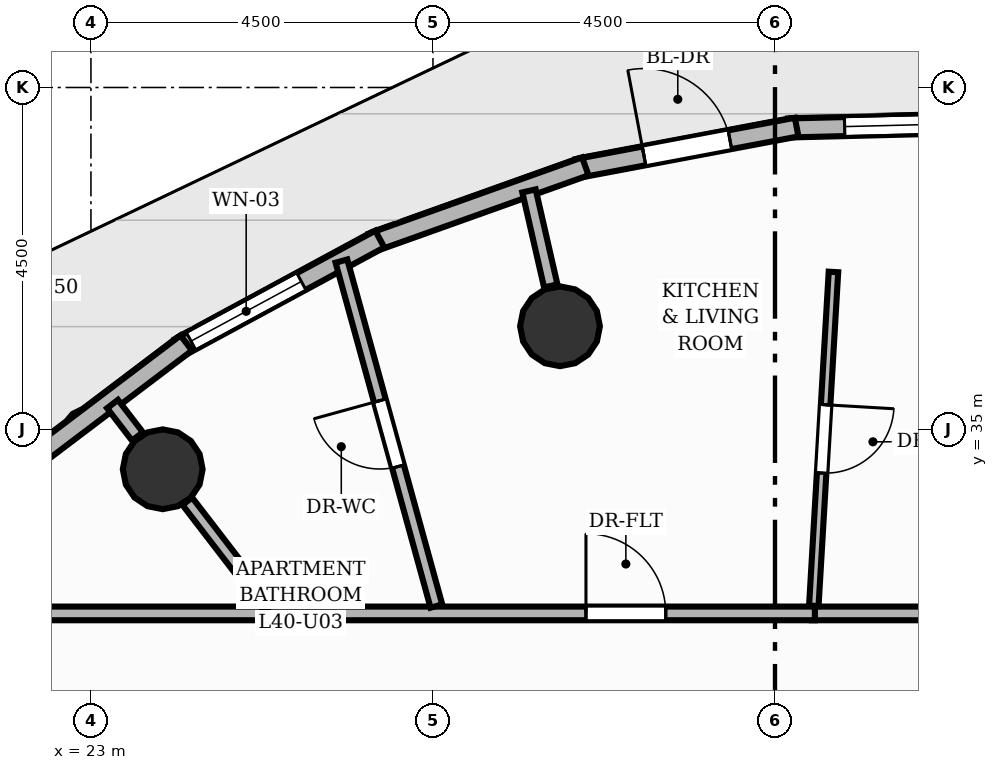
"""IFC4 building model, lengths in metres.
Left out: names, types, materials, properties, quantities, classifications, styles, units other than length and angle.
Written with IfcOpenShell. Run it as: python <this file> out.ifc"""

import sys

from ifc_helpers import new_model, si_unit, direction, frame, frame_2d, origin, origin_2d, place, context, subcontext, project, spatial, rectangle, circle, extrude, element, fill, save


model = new_model("IFC4")
c1 = context("Model", 3, precision=1e-05, world=origin(), true_north=direction((0.0, 1.0)))
c2 = subcontext(c1, "Body", "Model", "MODEL_VIEW")
j1 = project(units=[si_unit("LENGTHUNIT", "METRE"), si_unit("PLANEANGLEUNIT", "RADIAN")], contexts=[c1])
p1 = place(None, origin())
s1 = spatial("IfcSite", under=j1, at=p1, CompositionType="ELEMENT")
p2 = place(p1, origin())
s2 = spatial("IfcBuilding", under=s1, at=p2, CompositionType="ELEMENT")
p3 = place(p2, frame((0.0, 0.0, 136.16)))
s3 = spatial("IfcBuildingStorey", under=s2, at=p3, CompositionType="ELEMENT", Elevation=136.16)
for number, where, z_axis, x_axis in (
    (1, (29.171, 36.358, 0.0), (0.0, 0.0, 1.0), (1.0, 0.0, 0.0)),
    (2, (23.944, 34.477, 0.0), (0.0, 0.0, 1.0), (1.0, 0.0, 0.0)),
):
    element("IfcColumn", number, at=place(p3, frame(where, z_axis=z_axis, x_axis=x_axis)), inside=s3, PredefinedType="COLUMN", context=c2, shape_type="SweptSolid", body=[
        extrude(circle(Radius=0.525, at=origin_2d()), origin(), (0.0, 0.0, 1.0), 3.2),
    ])
p4 = place(p3, frame((32.176, 38.967, 0.0), z_axis=(0.0, 0.0, 1.0), x_axis=(0.999687646408, 0.02499219116, 0.0)))
e3 = element("IfcWall", 3, at=p4, inside=s3, PredefinedType="SOLIDWALL", context=c2, shape_type="SweptSolid", body=[
    extrude(rectangle(XDim=2.882, YDim=0.25, at=frame_2d((1.441, 0.0))), origin(), (0.0, 0.0, 1.0), 2.96),
])
p5 = place(p4, frame((0.741, 0.0, 0.85)))
e4 = element("IfcOpeningElement", 4, at=p5, cuts=e3, PredefinedType="OPENING", context=c2, shape_type="SweptSolid", body=[
    extrude(rectangle(XDim=1.4, YDim=1.55, at=frame_2d((0.7, 0.775))), frame((0.0, 0.135, 0.0), z_axis=(0.0, -1.0, 0.0), x_axis=(1.0, 0.0, 0.0)), (0.0, 0.0, 1.0), 0.27),
])
p6 = place(p3, frame((29.399, 38.434, 0.0), z_axis=(0.0, 0.0, 1.0), x_axis=(0.982637070109, 0.185538105108, 0.0)))
e5 = element("IfcWall", 5, at=p6, inside=s3, PredefinedType="SOLIDWALL", context=c2, shape_type="SweptSolid", body=[
    extrude(rectangle(XDim=2.937, YDim=0.25, at=frame_2d((1.469, 0.0))), origin(), (0.0, 0.0, 1.0), 2.96),
])
p7 = place(p6, frame((0.893, 0.0, 0.0)))
e6 = element("IfcOpeningElement", 6, at=p7, cuts=e5, PredefinedType="OPENING", context=c2, shape_type="SweptSolid", body=[
    extrude(rectangle(XDim=1.15, YDim=2.2, at=frame_2d((0.575, 1.1))), frame((0.0, 0.135, 0.0), z_axis=(0.0, -1.0, 0.0), x_axis=(1.0, 0.0, 0.0)), (0.0, 0.0, 1.0), 0.27),
])
p8 = place(p3, frame((26.701, 37.461, 0.0), z_axis=(0.0, 0.0, 1.0), x_axis=(0.94175304307, 0.33630522724, 0.0)))
e7 = element("IfcWall", 7, at=p8, inside=s3, PredefinedType="SOLIDWALL", context=c2, shape_type="SweptSolid", body=[
    extrude(rectangle(XDim=2.977, YDim=0.25, at=frame_2d((1.489, 0.0))), origin(), (0.0, 0.0, 1.0), 2.96),
])
p9 = place(p3, frame((24.163, 36.079, 0.0), z_axis=(0.0, 0.0, 1.0), x_axis=(0.879567466611, 0.475774181393, 0.0)))
e8 = element("IfcWall", 8, at=p9, inside=s3, PredefinedType="SOLIDWALL", context=c2, shape_type="SweptSolid", body=[
    extrude(rectangle(XDim=2.998, YDim=0.25, at=frame_2d((1.499, 0.0))), origin(), (0.0, 0.0, 1.0), 2.96),
])
p10 = place(p9, frame((0.175, 0.0, 0.85)))
e9 = element("IfcOpeningElement", 9, at=p10, cuts=e8, PredefinedType="OPENING", context=c2, shape_type="SweptSolid", body=[
    extrude(rectangle(XDim=1.65, YDim=1.55, at=frame_2d((0.825, 0.775))), frame((0.0, 0.135, 0.0), z_axis=(0.0, -1.0, 0.0), x_axis=(1.0, 0.0, 0.0)), (0.0, 0.0, 1.0), 0.27),
])
p11 = place(p3, frame((21.863, 34.329, 0.0), z_axis=(0.0, 0.0, 1.0), x_axis=(0.797511213298, 0.603304122863, 0.0)))
e10 = element("IfcWall", 10, at=p11, inside=s3, PredefinedType="SOLIDWALL", context=c2, shape_type="SweptSolid", body=[
    extrude(rectangle(XDim=2.998, YDim=0.25, at=frame_2d((1.499, 0.0))), origin(), (0.0, 0.0, 1.0), 2.96),
])
p12 = place(p3, frame((29.05, 36.889, 0.0), z_axis=(0.0, 0.0, 1.0), x_axis=(-0.223093561241, 0.974797036789, 0.0)))
e11 = element("IfcWall", 11, at=p12, inside=s3, PredefinedType="PARTITIONING", context=c2, shape_type="SweptSolid", body=[
    extrude(rectangle(XDim=1.282, YDim=0.18, at=frame_2d((0.641, 0.0))), origin(), (0.0, 0.0, 1.0), 2.336),
])
p13 = place(p3, frame((23.612, 34.908, 0.0), z_axis=(0.0, 0.0, 1.0), x_axis=(-0.609469486836, 0.792809526063, 0.0)))
e12 = element("IfcWall", 12, at=p13, inside=s3, PredefinedType="PARTITIONING", context=c2, shape_type="SweptSolid", body=[
    extrude(rectangle(XDim=0.538, YDim=0.18, at=frame_2d((0.269, 0.0))), origin(), (0.0, 0.0, 1.0), 2.336),
])
p14 = place(p3, frame((32.485, 32.58, 0.0), z_axis=(0.0, 0.0, 1.0), x_axis=(1.0, 0.0, 0.0)))
e13 = element("IfcWall", 13, at=p14, inside=s3, PredefinedType="PARTITIONING", context=c2, shape_type="SweptSolid", body=[
    extrude(rectangle(XDim=6.595, YDim=0.18, at=frame_2d((3.298, 0.0))), origin(), (0.0, 0.0, 1.0), 2.955),
])
p15 = place(p3, frame((21.42, 32.58, 0.0), z_axis=(0.0, 0.0, 1.0), x_axis=(1.0, 0.0, 0.0)))
e14 = element("IfcWall", 14, at=p15, inside=s3, PredefinedType="PARTITIONING", context=c2, shape_type="SweptSolid", body=[
    extrude(rectangle(XDim=11.105, YDim=0.18, at=frame_2d((5.552, 0.0))), origin(), (0.0, 0.0, 1.0), 2.955),
])
p16 = place(p15, frame((8.093, 0.0, 0.0)))
e15 = element("IfcOpeningElement", 15, at=p16, cuts=e14, PredefinedType="OPENING", context=c2, shape_type="SweptSolid", body=[
    extrude(rectangle(XDim=1.05, YDim=2.15, at=frame_2d((0.525, 1.075))), frame((0.0, 0.1, 0.0), z_axis=(0.0, -1.0, 0.0), x_axis=(1.0, 0.0, 0.0)), (0.0, 0.0, 1.0), 0.2),
])
p17 = place(p3, frame((27.545, 32.677, 0.0), z_axis=(0.0, 0.0, 1.0), x_axis=(-0.265393905211, 0.964140070258, 0.0)))
e16 = element("IfcWall", 16, at=p17, inside=s3, PredefinedType="PLUMBINGWALL", context=c2, shape_type="SweptSolid", body=[
    extrude(rectangle(XDim=4.708, YDim=0.16, at=frame_2d((2.354, 0.0))), origin(), (0.0, 0.0, 1.0), 2.955),
])
p18 = place(p17, frame((1.904, 0.0, 0.0)))
e17 = element("IfcOpeningElement", 17, at=p18, cuts=e16, PredefinedType="OPENING", context=c2, shape_type="SweptSolid", body=[
    extrude(rectangle(XDim=0.9, YDim=2.1, at=frame_2d((0.45, 1.05))), frame((0.0, 0.09, 0.0), z_axis=(0.0, -1.0, 0.0), x_axis=(1.0, 0.0, 0.0)), (0.0, 0.0, 1.0), 0.18),
])
p19 = place(p3, frame((32.769, 37.073, 0.0), z_axis=(0.0, 0.0, 1.0), x_axis=(-0.058751291398, -0.998272651012, 0.0)))
e18 = element("IfcWall", 18, at=p19, inside=s3, PredefinedType="PARTITIONING", context=c2, shape_type="SweptSolid", body=[
    extrude(rectangle(XDim=4.401, YDim=0.125, at=frame_2d((2.2, 0.0))), origin(), (0.0, 0.0, 1.0), 2.692),
])
p20 = place(p19, frame((1.75, 0.0, 0.0)))
e19 = element("IfcOpeningElement", 19, at=p20, cuts=e18, PredefinedType="OPENING", context=c2, shape_type="SweptSolid", body=[
    extrude(rectangle(XDim=0.9, YDim=2.1, at=frame_2d((0.45, 1.05))), frame((0.0, 0.073, 0.0), z_axis=(0.0, -1.0, 0.0), x_axis=(1.0, 0.0, 0.0)), (0.0, 0.0, 1.0), 0.145),
])
p21 = place(p3, frame((25.342, 32.659, 0.0), z_axis=(0.0, 0.0, 1.0), x_axis=(-0.609536601946, 0.792757927042, 0.0)))
e20 = element("IfcWall", 20, at=p21, inside=s3, PredefinedType="PLUMBINGWALL", context=c2, shape_type="SweptSolid", body=[
    extrude(rectangle(XDim=1.761, YDim=0.16, at=frame_2d((0.881, 0.0))), origin(), (0.0, 0.0, 1.0), 2.336),
])
p22 = place(p7, origin())
e21 = element("IfcDoor", 21, at=p22, inside=s3, OperationType="SINGLE_SWING_LEFT", PredefinedType="DOOR", context=c2, shape_type="SweptSolid", body=[
    extrude(rectangle(XDim=1.15, YDim=2.2, at=frame_2d((0.575, 1.1))), frame((0.0, 0.025, 0.0), z_axis=(0.0, -1.0, 0.0), x_axis=(1.0, 0.0, 0.0)), (0.0, 0.0, 1.0), 0.05),
])
fill(e6, e21)
p23 = place(p5, origin())
e22 = element("IfcWindow", 22, at=p23, inside=s3, PartitioningType="SINGLE_PANEL", PredefinedType="WINDOW", context=c2, shape_type="SweptSolid", body=[
    extrude(rectangle(XDim=1.4, YDim=1.55, at=frame_2d((0.7, 0.775))), frame((0.0, 0.03, 0.0), z_axis=(0.0, -1.0, 0.0), x_axis=(1.0, 0.0, 0.0)), (0.0, 0.0, 1.0), 0.06),
])
fill(e4, e22)
p24 = place(p10, origin())
e23 = element("IfcWindow", 23, at=p24, inside=s3, PartitioningType="SINGLE_PANEL", PredefinedType="WINDOW", context=c2, shape_type="SweptSolid", body=[
    extrude(rectangle(XDim=1.65, YDim=1.55, at=frame_2d((0.825, 0.775))), frame((0.0, 0.03, 0.0), z_axis=(0.0, -1.0, 0.0), x_axis=(1.0, 0.0, 0.0)), (0.0, 0.0, 1.0), 0.06),
])
fill(e9, e23)
p25 = place(p16, origin())
e24 = element("IfcDoor", 24, at=p25, inside=s3, OperationType="SINGLE_SWING_LEFT", PredefinedType="DOOR", context=c2, shape_type="SweptSolid", body=[
    extrude(rectangle(XDim=1.05, YDim=2.15, at=frame_2d((0.525, 1.075))), frame((0.0, 0.025, 0.0), z_axis=(0.0, -1.0, 0.0), x_axis=(1.0, 0.0, 0.0)), (0.0, 0.0, 1.0), 0.05),
])
fill(e15, e24)
p26 = place(p18, origin())
e25 = element("IfcDoor", 25, at=p26, inside=s3, OperationType="SINGLE_SWING_RIGHT", PredefinedType="DOOR", context=c2, shape_type="SweptSolid", body=[
    extrude(rectangle(XDim=0.9, YDim=2.1, at=frame_2d((0.45, 1.05))), frame((0.0, 0.025, 0.0), z_axis=(0.0, -1.0, 0.0), x_axis=(1.0, 0.0, 0.0)), (0.0, 0.0, 1.0), 0.05),
])
fill(e17, e25)
p27 = place(p20, origin())
e26 = element("IfcDoor", 26, at=p27, inside=s3, OperationType="SINGLE_SWING_LEFT", PredefinedType="DOOR", context=c2, shape_type="SweptSolid", body=[
    extrude(rectangle(XDim=0.9, YDim=2.1, at=frame_2d((0.45, 1.05))), frame((0.0, 0.025, 0.0), z_axis=(0.0, -1.0, 0.0), x_axis=(1.0, 0.0, 0.0)), (0.0, 0.0, 1.0), 0.05),
])
fill(e19, e26)
save(model, sys.argv[1])
